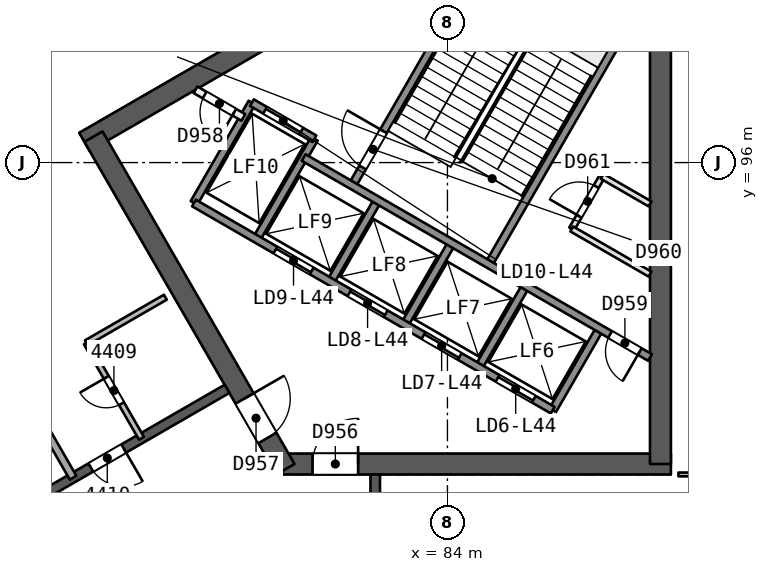
"""IFC4 building model, lengths in metres.
Left out: names, types, materials, properties, quantities, classifications, styles, units other than length and angle.
Written with IfcOpenShell. Run it as: python <this file> out.ifc"""

import sys

from ifc_helpers import new_model, si_unit, direction, frame, frame_2d, origin, place, context, subcontext, project, spatial, rectangle, extrude, element, fill, save


model = new_model("IFC4")
c1 = context("Model", 3, precision=1e-05, world=origin(), true_north=direction((0.0, 1.0)))
c2 = subcontext(c1, "Body", "Model", "MODEL_VIEW")
j1 = project(units=[si_unit("LENGTHUNIT", "METRE"), si_unit("PLANEANGLEUNIT", "RADIAN")], contexts=[c1])
p1 = place(None, origin())
s1 = spatial("IfcSite", under=j1, at=p1, CompositionType="ELEMENT")
p2 = place(p1, origin())
s2 = spatial("IfcBuilding", under=s1, at=p2, CompositionType="ELEMENT")
p3 = place(p2, frame((0.0, 0.0, 182.2)))
s3 = spatial("IfcBuildingStorey", under=s2, at=p3, CompositionType="ELEMENT", Elevation=182.2)
p4 = place(p3, frame((79.659, 88.069, 0.0), z_axis=(0.0, 0.0, 1.0), x_axis=(1.0, 0.0, 0.0)))
e1 = element("IfcWall", 1, at=p4, inside=s3, PredefinedType="SHEAR", context=c2, shape_type="SweptSolid", body=[
    extrude(rectangle(XDim=10.221, YDim=0.55, at=frame_2d((5.111, 0.0))), origin(), (0.0, 0.0, 1.0), 3.7),
])
p5 = place(p4, frame((0.791, 0.0, 0.0)))
e2 = element("IfcOpeningElement", 2, at=p5, cuts=e1, PredefinedType="OPENING", context=c2, shape_type="SweptSolid", body=[
    extrude(rectangle(XDim=1.2, YDim=2.1, at=frame_2d((0.6, 1.05))), frame((0.0, 0.286, 0.0), z_axis=(0.0, -1.0, 0.0), x_axis=(1.0, 0.0, 0.0)), (0.0, 0.0, 1.0), 0.571),
])
p6 = place(p3, frame((89.605, 88.069, 0.0), z_axis=(0.0, 0.0, 1.0), x_axis=(0.0, 1.0, 0.0)))
e3 = element("IfcWall", 3, at=p6, inside=s3, PredefinedType="SHEAR", context=c2, shape_type="SweptSolid", body=[
    extrude(rectangle(XDim=14.058, YDim=0.55, at=frame_2d((7.029, 0.0))), origin(), (0.0, 0.0, 1.0), 3.7),
])
p7 = place(p3, frame((86.723, 103.633, 0.0), z_axis=(0.0, 0.0, 1.0), x_axis=(-0.866023530946, -0.500003243837, 0.0)))
e4 = element("IfcWall", 4, at=p7, inside=s3, PredefinedType="SHEAR", context=c2, shape_type="SweptSolid", body=[
    extrude(rectangle(XDim=14.175, YDim=0.55, at=frame_2d((7.087, 0.0))), origin(), (0.0, 0.0, 1.0), 3.7),
])
p8 = place(p3, frame((74.686, 96.683, 0.0), z_axis=(0.0, 0.0, 1.0), x_axis=(0.499997818338, -0.866026663364, 0.0)))
e5 = element("IfcWall", 5, at=p8, inside=s3, PredefinedType="SHEAR", context=c2, shape_type="SweptSolid", body=[
    extrude(rectangle(XDim=10.105, YDim=0.55, at=frame_2d((5.052, 0.0))), origin(), (0.0, 0.0, 1.0), 3.7),
])
p9 = place(p8, frame((7.955, 0.0, 0.0)))
e6 = element("IfcOpeningElement", 6, at=p9, cuts=e5, PredefinedType="OPENING", context=c2, shape_type="SweptSolid", body=[
    extrude(rectangle(XDim=1.2, YDim=2.1, at=frame_2d((0.6, 1.05))), frame((0.0, 0.286, 0.0), z_axis=(0.0, -1.0, 0.0), x_axis=(1.0, 0.0, 0.0)), (0.0, 0.0, 1.0), 0.571),
])
p10 = place(p3, frame((82.1, 72.206, 0.0), z_axis=(0.0, 0.0, 1.0), x_axis=(0.0, 1.0, 0.0)))
e7 = element("IfcWall", 7, at=p10, inside=s3, PredefinedType="SHEAR", context=c2, shape_type="SweptSolid", body=[
    extrude(rectangle(XDim=15.588, YDim=0.25, at=frame_2d((7.794, 0.0))), origin(), (0.0, 0.0, 1.0), 3.25),
])
p11 = place(p10, frame((2.747, 0.0, 0.0)))
e8 = element("IfcOpeningElement", 8, at=p11, cuts=e7, PredefinedType="OPENING", context=c2, shape_type="SweptSolid", body=[
    extrude(rectangle(XDim=1.0, YDim=2.1, at=frame_2d((0.5, 1.05))), frame((0.0, 0.135, 0.0), z_axis=(0.0, -1.0, 0.0), x_axis=(1.0, 0.0, 0.0)), (0.0, 0.0, 1.0), 0.271),
])
p12 = place(p10, frame((5.396, 0.0, 0.0)))
e9 = element("IfcOpeningElement", 9, at=p12, cuts=e7, PredefinedType="OPENING", context=c2, shape_type="SweptSolid", body=[
    extrude(rectangle(XDim=0.9, YDim=2.1, at=frame_2d((0.45, 1.05))), frame((0.0, 0.135, 0.0), z_axis=(0.0, -1.0, 0.0), x_axis=(1.0, 0.0, 0.0)), (0.0, 0.0, 1.0), 0.271),
])
p13 = place(p10, frame((9.293, 0.0, 0.0)))
e10 = element("IfcOpeningElement", 10, at=p13, cuts=e7, PredefinedType="OPENING", context=c2, shape_type="SweptSolid", body=[
    extrude(rectangle(XDim=0.9, YDim=2.1, at=frame_2d((0.45, 1.05))), frame((0.0, 0.135, 0.0), z_axis=(0.0, -1.0, 0.0), x_axis=(1.0, 0.0, 0.0)), (0.0, 0.0, 1.0), 0.271),
])
p14 = place(p10, frame((13.14, 0.0, 0.0)))
e11 = element("IfcOpeningElement", 11, at=p14, cuts=e7, PredefinedType="OPENING", context=c2, shape_type="SweptSolid", body=[
    extrude(rectangle(XDim=1.0, YDim=2.1, at=frame_2d((0.5, 1.05))), frame((0.0, 0.135, 0.0), z_axis=(0.0, -1.0, 0.0), x_axis=(1.0, 0.0, 0.0)), (0.0, 0.0, 1.0), 0.271),
])
p15 = place(p3, frame((78.2, 90.046, 0.0), z_axis=(0.0, 0.0, 1.0), x_axis=(-0.866026492143, -0.499998114903, 0.0)))
e12 = element("IfcWall", 12, at=p15, inside=s3, PredefinedType="SHEAR", context=c2, shape_type="SweptSolid", body=[
    extrude(rectangle(XDim=15.588, YDim=0.25, at=frame_2d((7.794, 0.0))), origin(), (0.0, 0.0, 1.0), 3.25),
])
p16 = place(p15, frame((3.138, 0.0, 0.0)))
e13 = element("IfcOpeningElement", 13, at=p16, cuts=e12, PredefinedType="OPENING", context=c2, shape_type="SweptSolid", body=[
    extrude(rectangle(XDim=1.0, YDim=2.1, at=frame_2d((0.5, 1.05))), frame((0.0, 0.135, 0.0), z_axis=(0.0, -1.0, 0.0), x_axis=(1.0, 0.0, 0.0)), (0.0, 0.0, 1.0), 0.271),
])
p17 = place(p15, frame((6.415, 0.0, 0.0)))
e14 = element("IfcOpeningElement", 14, at=p17, cuts=e12, PredefinedType="OPENING", context=c2, shape_type="SweptSolid", body=[
    extrude(rectangle(XDim=1.2, YDim=2.4, at=frame_2d((0.6, 1.2))), frame((0.0, 0.135, 0.0), z_axis=(0.0, -1.0, 0.0), x_axis=(1.0, 0.0, 0.0)), (0.0, 0.0, 1.0), 0.271),
])
p18 = place(p15, frame((11.971, 0.0, 0.0)))
e15 = element("IfcOpeningElement", 15, at=p18, cuts=e12, PredefinedType="OPENING", context=c2, shape_type="SweptSolid", body=[
    extrude(rectangle(XDim=1.0, YDim=2.1, at=frame_2d((0.5, 1.05))), frame((0.0, 0.135, 0.0), z_axis=(0.0, -1.0, 0.0), x_axis=(1.0, 0.0, 0.0)), (0.0, 0.0, 1.0), 0.271),
])
p19 = place(p3, frame((93.278, 87.794, 0.0), z_axis=(0.0, 0.0, 1.0), x_axis=(-1.0, 0.0, 0.0)))
e16 = element("IfcWall", 16, at=p19, inside=s3, PredefinedType="PARTITIONING", context=c2, shape_type="SweptSolid", body=[
    extrude(rectangle(XDim=3.199, YDim=0.1, at=frame_2d((1.6, 0.0))), origin(), (0.0, 0.0, 1.0), 3.25),
])
p20 = place(p19, frame((1.15, 0.0, 0.0)))
e17 = element("IfcOpeningElement", 17, at=p20, cuts=e16, PredefinedType="OPENING", context=c2, shape_type="SweptSolid", body=[
    extrude(rectangle(XDim=0.9, YDim=2.1, at=frame_2d((0.45, 1.05))), frame((0.0, 0.061, 0.0), z_axis=(0.0, -1.0, 0.0), x_axis=(1.0, 0.0, 0.0)), (0.0, 0.0, 1.0), 0.121),
])
p21 = place(p3, frame((75.948, 88.746, 0.0), z_axis=(0.0, 0.0, 1.0), x_axis=(-0.499987231761, 0.866032775405, 0.0)))
e18 = element("IfcWall", 18, at=p21, inside=s3, PredefinedType="PARTITIONING", context=c2, shape_type="SweptSolid", body=[
    extrude(rectangle(XDim=2.9, YDim=0.15, at=frame_2d((1.45, 0.0))), origin(), (0.0, 0.0, 1.0), 3.25),
])
p22 = place(p21, frame((1.05, 0.0, 0.0)))
e19 = element("IfcOpeningElement", 19, at=p22, cuts=e18, PredefinedType="OPENING", context=c2, shape_type="SweptSolid", body=[
    extrude(rectangle(XDim=0.8, YDim=2.1, at=frame_2d((0.4, 1.05))), frame((0.0, 0.085, 0.0), z_axis=(0.0, -1.0, 0.0), x_axis=(1.0, 0.0, 0.0)), (0.0, 0.0, 1.0), 0.171),
])
p23 = place(p3, frame((74.498, 91.257, 0.0), z_axis=(0.0, 0.0, 1.0), x_axis=(0.866038271014, 0.499977712642, 0.0)))
e20 = element("IfcWall", 20, at=p23, inside=s3, PredefinedType="PARTITIONING", context=c2, shape_type="SweptSolid", body=[
    extrude(rectangle(XDim=2.401, YDim=0.15, at=frame_2d((1.2, 0.0))), origin(), (0.0, 0.0, 1.0), 3.25),
])
p24 = place(p3, frame((68.561, 97.388, 0.0), z_axis=(0.0, 0.0, 1.0), x_axis=(0.499998478678, -0.866026282118, 0.0)))
e21 = element("IfcWall", 21, at=p24, inside=s3, PredefinedType="PARTITIONING", context=c2, shape_type="SweptSolid", body=[
    extrude(rectangle(XDim=11.178, YDim=0.2, at=frame_2d((5.589, 0.0))), origin(), (0.0, 0.0, 1.0), 3.25),
])
p25 = place(p3, frame((42.841, 82.711, 0.0), z_axis=(0.0, 0.0, 1.0), x_axis=(0.866024774967, 0.500001089142, 0.0)))
e22 = element("IfcWall", 22, at=p25, inside=s3, PredefinedType="SOLIDWALL", context=c2, shape_type="SweptSolid", body=[
    extrude(rectangle(XDim=52.991, YDim=0.3, at=frame_2d((26.496, 0.0))), origin(), (0.0, 0.0, 1.0), 3.25),
])
p26 = place(p25, frame((20.619, 0.0, 0.0)))
e23 = element("IfcOpeningElement", 23, at=p26, cuts=e22, PredefinedType="OPENING", context=c2, shape_type="SweptSolid", body=[
    extrude(rectangle(XDim=2.4, YDim=2.4, at=frame_2d((1.2, 1.2))), frame((0.0, 0.161, 0.0), z_axis=(0.0, -1.0, 0.0), x_axis=(1.0, 0.0, 0.0)), (0.0, 0.0, 1.0), 0.321),
])
p27 = place(p25, frame((9.392, 0.0, 0.0)))
e24 = element("IfcOpeningElement", 24, at=p27, cuts=e22, PredefinedType="OPENING", context=c2, shape_type="SweptSolid", body=[
    extrude(rectangle(XDim=2.4, YDim=2.4, at=frame_2d((1.2, 1.2))), frame((0.0, 0.161, 0.0), z_axis=(0.0, -1.0, 0.0), x_axis=(1.0, 0.0, 0.0)), (0.0, 0.0, 1.0), 0.321),
])
p28 = place(p25, frame((40.145, 0.0, 0.0)))
e25 = element("IfcOpeningElement", 25, at=p28, cuts=e22, PredefinedType="OPENING", context=c2, shape_type="SweptSolid", body=[
    extrude(rectangle(XDim=2.4, YDim=2.4, at=frame_2d((1.2, 1.2))), frame((0.0, 0.161, 0.0), z_axis=(0.0, -1.0, 0.0), x_axis=(1.0, 0.0, 0.0)), (0.0, 0.0, 1.0), 0.321),
])
p29 = place(p25, frame((26.375, 0.0, 0.9)))
e26 = element("IfcOpeningElement", 26, at=p29, cuts=e22, PredefinedType="OPENING", context=c2, shape_type="SweptSolid", body=[
    extrude(rectangle(XDim=1.8, YDim=1.5, at=frame_2d((0.9, 0.75))), frame((0.0, 0.161, 0.0), z_axis=(0.0, -1.0, 0.0), x_axis=(1.0, 0.0, 0.0)), (0.0, 0.0, 1.0), 0.321),
])
p30 = place(p3, frame((86.77, 89.486, 0.0), z_axis=(0.0, 0.0, 1.0), x_axis=(0.499961042966, 0.86604789447, 0.0)))
e27 = element("IfcWall", 27, at=p30, inside=s3, PredefinedType="SOLIDWALL", context=c2, shape_type="SweptSolid", body=[
    extrude(rectangle(XDim=2.48, YDim=0.2, at=frame_2d((1.24, 0.0))), origin(), (0.0, 0.0, 1.0), 3.25),
])
p31 = place(p3, frame((87.271, 94.254, 0.0), z_axis=(0.0, 0.0, 1.0), x_axis=(0.499995408039, 0.866028054938, 0.0)))
e28 = element("IfcWall", 28, at=p31, inside=s3, PredefinedType="PARTITIONING", context=c2, shape_type="SweptSolid", body=[
    extrude(rectangle(XDim=1.6, YDim=0.15, at=frame_2d((0.8, 0.0))), origin(), (0.0, 0.0, 1.0), 3.25),
])
p32 = place(p31, frame((0.387, 0.0, 0.0)))
e29 = element("IfcOpeningElement", 29, at=p32, cuts=e28, PredefinedType="OPENING", context=c2, shape_type="SweptSolid", body=[
    extrude(rectangle(XDim=0.9, YDim=2.1, at=frame_2d((0.45, 1.05))), frame((0.0, 0.085, 0.0), z_axis=(0.0, -1.0, 0.0), x_axis=(1.0, 0.0, 0.0)), (0.0, 0.0, 1.0), 0.171),
])
p33 = place(p3, frame((84.821, 90.611, 0.0), z_axis=(0.0, 0.0, 1.0), x_axis=(0.499961042966, 0.86604789447, 0.0)))
e30 = element("IfcWall", 30, at=p33, inside=s3, PredefinedType="SOLIDWALL", context=c2, shape_type="SweptSolid", body=[
    extrude(rectangle(XDim=2.48, YDim=0.2, at=frame_2d((1.24, 0.0))), origin(), (0.0, 0.0, 1.0), 3.25),
])
p34 = place(p3, frame((85.087, 93.321, 0.0), z_axis=(0.0, 0.0, 1.0), x_axis=(0.500019787375, 0.866013979237, 0.0)))
e31 = element("IfcWall", 31, at=p34, inside=s3, PredefinedType="SOLIDWALL", context=c2, shape_type="SweptSolid", body=[
    extrude(rectangle(XDim=7.7, YDim=0.2, at=frame_2d((3.85, 0.0))), origin(), (0.0, 0.0, 1.0), 3.25),
])
for number, where, z_axis, x_axis in (
    (32, (82.873, 91.736, 0.0), (0.0, 0.0, 1.0), (0.5, 0.866, 0.0)),
    (33, (80.924, 92.861, 0.0), (0.0, 0.0, 1.0), (0.5, 0.866, 0.0)),
):
    element("IfcWall", number, at=place(p3, frame(where, z_axis=z_axis, x_axis=x_axis)), inside=s3, PredefinedType="SOLIDWALL", context=c2, shape_type="SweptSolid", body=[
        extrude(rectangle(XDim=2.48, YDim=0.2, at=frame_2d((1.24, 0.0))), origin(), (0.0, 0.0, 1.0), 3.25),
    ])
p35 = place(p3, frame((81.493, 95.396, 0.0), z_axis=(0.0, 0.0, 1.0), x_axis=(0.500006057782, 0.866021906294, 0.0)))
e34 = element("IfcWall", 34, at=p35, inside=s3, PredefinedType="SOLIDWALL", context=c2, shape_type="SweptSolid", body=[
    extrude(rectangle(XDim=7.7, YDim=0.2, at=frame_2d((3.85, 0.0))), origin(), (0.0, 0.0, 1.0), 3.25),
])
p36 = place(p35, frame((0.55, 0.0, 0.0)))
e35 = element("IfcOpeningElement", 35, at=p36, cuts=e34, PredefinedType="OPENING", context=c2, shape_type="SweptSolid", body=[
    extrude(rectangle(XDim=1.1, YDim=2.1, at=frame_2d((0.55, 1.05))), frame((0.0, 0.11, 0.0), z_axis=(0.0, -1.0, 0.0), x_axis=(1.0, 0.0, 0.0)), (0.0, 0.0, 1.0), 0.221),
])
for number, where, z_axis, x_axis in (
    (36, (78.976, 93.986, 0.0), (0.0, 0.0, 1.0), (0.5, 0.866, 0.0)),
    (37, (77.33, 94.936, 0.0), (0.0, 0.0, 1.0), (0.5, 0.866, 0.0)),
):
    element("IfcWall", number, at=place(p3, frame(where, z_axis=z_axis, x_axis=x_axis)), inside=s3, PredefinedType="SOLIDWALL", context=c2, shape_type="SweptSolid", body=[
        extrude(rectangle(XDim=3.05, YDim=0.2, at=frame_2d((1.525, 0.0))), origin(), (0.0, 0.0, 1.0), 3.25),
    ])
p37 = place(p3, frame((86.77, 89.486, 0.0), z_axis=(0.0, 0.0, 1.0), x_axis=(-0.86601811187, 0.500012629753, 0.0)))
e38 = element("IfcWall", 38, at=p37, inside=s3, PredefinedType="SOLIDWALL", context=c2, shape_type="SweptSolid", body=[
    extrude(rectangle(XDim=10.9, YDim=0.2, at=frame_2d((5.45, 0.0))), origin(), (0.0, 0.0, 1.0), 3.25),
])
p38 = place(p37, frame((0.575, 0.0, 0.0)))
e39 = element("IfcOpeningElement", 39, at=p38, cuts=e38, PredefinedType="OPENING", context=c2, shape_type="SweptSolid", body=[
    extrude(rectangle(XDim=1.1, YDim=2.1, at=frame_2d((0.55, 1.05))), frame((0.0, 0.11, 0.0), z_axis=(0.0, -1.0, 0.0), x_axis=(1.0, 0.0, 0.0)), (0.0, 0.0, 1.0), 0.221),
])
p39 = place(p37, frame((2.825, 0.0, 0.0)))
e40 = element("IfcOpeningElement", 40, at=p39, cuts=e38, PredefinedType="OPENING", context=c2, shape_type="SweptSolid", body=[
    extrude(rectangle(XDim=1.1, YDim=2.1, at=frame_2d((0.55, 1.05))), frame((0.0, 0.11, 0.0), z_axis=(0.0, -1.0, 0.0), x_axis=(1.0, 0.0, 0.0)), (0.0, 0.0, 1.0), 0.221),
])
p40 = place(p37, frame((5.075, 0.0, 0.0)))
e41 = element("IfcOpeningElement", 41, at=p40, cuts=e38, PredefinedType="OPENING", context=c2, shape_type="SweptSolid", body=[
    extrude(rectangle(XDim=1.1, YDim=2.1, at=frame_2d((0.55, 1.05))), frame((0.0, 0.11, 0.0), z_axis=(0.0, -1.0, 0.0), x_axis=(1.0, 0.0, 0.0)), (0.0, 0.0, 1.0), 0.221),
])
p41 = place(p37, frame((7.325, 0.0, 0.0)))
e42 = element("IfcOpeningElement", 42, at=p41, cuts=e38, PredefinedType="OPENING", context=c2, shape_type="SweptSolid", body=[
    extrude(rectangle(XDim=1.1, YDim=2.1, at=frame_2d((0.55, 1.05))), frame((0.0, 0.11, 0.0), z_axis=(0.0, -1.0, 0.0), x_axis=(1.0, 0.0, 0.0)), (0.0, 0.0, 1.0), 0.221),
])
p42 = place(p3, frame((89.33, 90.872, 0.0), z_axis=(0.0, 0.0, 1.0), x_axis=(-0.866027589512, 0.49999621419, 0.0)))
e43 = element("IfcWall", 43, at=p42, inside=s3, PredefinedType="SOLIDWALL", context=c2, shape_type="SweptSolid", body=[
    extrude(rectangle(XDim=10.524, YDim=0.2, at=frame_2d((5.262, 0.0))), origin(), (0.0, 0.0, 1.0), 3.25),
])
p43 = place(p42, frame((0.312, 0.0, 0.0)))
e44 = element("IfcOpeningElement", 44, at=p43, cuts=e43, PredefinedType="OPENING", context=c2, shape_type="SweptSolid", body=[
    extrude(rectangle(XDim=0.9, YDim=2.1, at=frame_2d((0.45, 1.05))), frame((0.0, 0.11, 0.0), z_axis=(0.0, -1.0, 0.0), x_axis=(1.0, 0.0, 0.0)), (0.0, 0.0, 1.0), 0.221),
])
p44 = place(p3, frame((78.63, 97.188, 0.0), z_axis=(0.0, 0.0, 1.0), x_axis=(-0.866003949776, 0.500037157592, 0.0)))
e45 = element("IfcWall", 45, at=p44, inside=s3, PredefinedType="PARTITIONING", context=c2, shape_type="SweptSolid", body=[
    extrude(rectangle(XDim=1.455, YDim=0.2, at=frame_2d((0.728, 0.0))), origin(), (0.0, 0.0, 1.0), 3.25),
])
p45 = place(p44, frame((0.278, 0.0, 0.0)))
e46 = element("IfcOpeningElement", 46, at=p45, cuts=e45, PredefinedType="OPENING", context=c2, shape_type="SweptSolid", body=[
    extrude(rectangle(XDim=0.9, YDim=2.1, at=frame_2d((0.45, 1.05))), frame((0.0, 0.11, 0.0), z_axis=(0.0, -1.0, 0.0), x_axis=(1.0, 0.0, 0.0)), (0.0, 0.0, 1.0), 0.221),
])
p46 = place(p3, frame((80.5, 96.627, 0.0), z_axis=(0.0, 0.0, 1.0), x_axis=(-0.86601224135, 0.500022797313, 0.0)))
e47 = element("IfcWall", 47, at=p46, inside=s3, PredefinedType="SOLIDWALL", context=c2, shape_type="SweptSolid", body=[
    extrude(rectangle(XDim=1.9, YDim=0.2, at=frame_2d((0.95, 0.0))), origin(), (0.0, 0.0, 1.0), 3.25),
])
p47 = place(p46, frame((0.4, 0.0, 0.0)))
e48 = element("IfcOpeningElement", 48, at=p47, cuts=e47, PredefinedType="OPENING", context=c2, shape_type="SweptSolid", body=[
    extrude(rectangle(XDim=1.1, YDim=2.1, at=frame_2d((0.55, 1.05))), frame((0.0, 0.11, 0.0), z_axis=(0.0, -1.0, 0.0), x_axis=(1.0, 0.0, 0.0)), (0.0, 0.0, 1.0), 0.221),
])
p48 = place(p3, frame((89.33, 93.065, 0.0), z_axis=(0.0, 0.0, 1.0), x_axis=(-0.866041951395, 0.499971337603, 0.0)))
e49 = element("IfcWall", 49, at=p48, inside=s3, PredefinedType="PARTITIONING", context=c2, shape_type="SweptSolid", body=[
    extrude(rectangle(XDim=2.378, YDim=0.15, at=frame_2d((1.189, 0.0))), origin(), (0.0, 0.0, 1.0), 3.25),
])
p49 = place(p3, frame((89.33, 94.913, 0.0), z_axis=(0.0, 0.0, 1.0), x_axis=(-0.865981433661, 0.500076150755, 0.0)))
e50 = element("IfcWall", 50, at=p49, inside=s3, PredefinedType="PARTITIONING", context=c2, shape_type="SweptSolid", body=[
    extrude(rectangle(XDim=1.454, YDim=0.15, at=frame_2d((0.727, 0.0))), origin(), (0.0, 0.0, 1.0), 3.25),
])
p50 = place(p22, origin())
e51 = element("IfcDoor", 51, at=p50, inside=s3, OperationType="SINGLE_SWING_RIGHT", PredefinedType="NOTDEFINED", context=c2, shape_type="SweptSolid", body=[
    extrude(rectangle(XDim=0.8, YDim=2.1, at=frame_2d((0.4, 1.05))), frame((0.0, 0.025, 0.0), z_axis=(0.0, -1.0, 0.0), x_axis=(1.0, 0.0, 0.0)), (0.0, 0.0, 1.0), 0.05),
])
fill(e19, e51)
p51 = place(p16, origin())
e52 = element("IfcDoor", 52, at=p51, inside=s3, OperationType="SINGLE_SWING_LEFT", PredefinedType="NOTDEFINED", context=c2, shape_type="SweptSolid", body=[
    extrude(rectangle(XDim=1.0, YDim=2.1, at=frame_2d((0.5, 1.05))), frame((0.0, 0.025, 0.0), z_axis=(0.0, -1.0, 0.0), x_axis=(1.0, 0.0, 0.0)), (0.0, 0.0, 1.0), 0.05),
])
fill(e13, e52)
p52 = place(p5, origin())
e53 = element("IfcDoor", 53, at=p52, inside=s3, OperationType="SINGLE_SWING_RIGHT", PredefinedType="NOTDEFINED", context=c2, shape_type="SweptSolid", body=[
    extrude(rectangle(XDim=1.2, YDim=2.1, at=frame_2d((0.6, 1.05))), frame((0.0, 0.025, 0.0), z_axis=(0.0, -1.0, 0.0), x_axis=(1.0, 0.0, 0.0)), (0.0, 0.0, 1.0), 0.05),
])
fill(e2, e53)
p53 = place(p9, origin())
e54 = element("IfcDoor", 54, at=p53, inside=s3, OperationType="SINGLE_SWING_LEFT", PredefinedType="NOTDEFINED", context=c2, shape_type="SweptSolid", body=[
    extrude(rectangle(XDim=1.2, YDim=2.1, at=frame_2d((0.6, 1.05))), frame((0.0, 0.025, 0.0), z_axis=(0.0, -1.0, 0.0), x_axis=(1.0, 0.0, 0.0)), (0.0, 0.0, 1.0), 0.05),
])
fill(e6, e54)
p54 = place(p38, origin())
e55 = element("IfcDoor", 55, at=p54, inside=s3, OperationType="SLIDING_TO_RIGHT", PredefinedType="NOTDEFINED", context=c2, shape_type="SweptSolid", body=[
    extrude(rectangle(XDim=1.1, YDim=2.1, at=frame_2d((0.55, 1.05))), frame((0.0, 0.025, 0.0), z_axis=(0.0, -1.0, 0.0), x_axis=(1.0, 0.0, 0.0)), (0.0, 0.0, 1.0), 0.05),
])
fill(e39, e55)
p55 = place(p39, origin())
e56 = element("IfcDoor", 56, at=p55, inside=s3, OperationType="SLIDING_TO_LEFT", PredefinedType="NOTDEFINED", context=c2, shape_type="SweptSolid", body=[
    extrude(rectangle(XDim=1.1, YDim=2.1, at=frame_2d((0.55, 1.05))), frame((0.0, 0.025, 0.0), z_axis=(0.0, -1.0, 0.0), x_axis=(1.0, 0.0, 0.0)), (0.0, 0.0, 1.0), 0.05),
])
fill(e40, e56)
p56 = place(p40, origin())
e57 = element("IfcDoor", 57, at=p56, inside=s3, OperationType="SLIDING_TO_RIGHT", PredefinedType="NOTDEFINED", context=c2, shape_type="SweptSolid", body=[
    extrude(rectangle(XDim=1.1, YDim=2.1, at=frame_2d((0.55, 1.05))), frame((0.0, 0.025, 0.0), z_axis=(0.0, -1.0, 0.0), x_axis=(1.0, 0.0, 0.0)), (0.0, 0.0, 1.0), 0.05),
])
fill(e41, e57)
p57 = place(p41, origin())
e58 = element("IfcDoor", 58, at=p57, inside=s3, OperationType="SLIDING_TO_LEFT", PredefinedType="NOTDEFINED", context=c2, shape_type="SweptSolid", body=[
    extrude(rectangle(XDim=1.1, YDim=2.1, at=frame_2d((0.55, 1.05))), frame((0.0, 0.025, 0.0), z_axis=(0.0, -1.0, 0.0), x_axis=(1.0, 0.0, 0.0)), (0.0, 0.0, 1.0), 0.05),
])
fill(e42, e58)
p58 = place(p47, origin())
e59 = element("IfcDoor", 59, at=p58, inside=s3, OperationType="SLIDING_TO_RIGHT", PredefinedType="NOTDEFINED", context=c2, shape_type="SweptSolid", body=[
    extrude(rectangle(XDim=1.1, YDim=2.1, at=frame_2d((0.55, 1.05))), frame((0.0, 0.025, 0.0), z_axis=(0.0, -1.0, 0.0), x_axis=(1.0, 0.0, 0.0)), (0.0, 0.0, 1.0), 0.05),
])
fill(e48, e59)
p59 = place(p45, origin())
e60 = element("IfcDoor", 60, at=p59, inside=s3, OperationType="SINGLE_SWING_LEFT", PredefinedType="NOTDEFINED", context=c2, shape_type="SweptSolid", body=[
    extrude(rectangle(XDim=0.9, YDim=2.1, at=frame_2d((0.45, 1.05))), frame((0.0, 0.025, 0.0), z_axis=(0.0, -1.0, 0.0), x_axis=(1.0, 0.0, 0.0)), (0.0, 0.0, 1.0), 0.05),
])
fill(e46, e60)
p60 = place(p43, origin())
e61 = element("IfcDoor", 61, at=p60, inside=s3, OperationType="SINGLE_SWING_LEFT", PredefinedType="NOTDEFINED", context=c2, shape_type="SweptSolid", body=[
    extrude(rectangle(XDim=0.9, YDim=2.1, at=frame_2d((0.45, 1.05))), frame((0.0, 0.025, 0.0), z_axis=(0.0, -1.0, 0.0), x_axis=(1.0, 0.0, 0.0)), (0.0, 0.0, 1.0), 0.05),
])
fill(e44, e61)
p61 = place(p36, origin())
e62 = element("IfcDoor", 62, at=p61, inside=s3, OperationType="SINGLE_SWING_RIGHT", PredefinedType="NOTDEFINED", context=c2, shape_type="SweptSolid", body=[
    extrude(rectangle(XDim=1.1, YDim=2.1, at=frame_2d((0.55, 1.05))), frame((0.0, 0.025, 0.0), z_axis=(0.0, -1.0, 0.0), x_axis=(1.0, 0.0, 0.0)), (0.0, 0.0, 1.0), 0.05),
])
fill(e35, e62)
p62 = place(p32, origin())
e63 = element("IfcDoor", 63, at=p62, inside=s3, OperationType="SINGLE_SWING_LEFT", PredefinedType="NOTDEFINED", context=c2, shape_type="SweptSolid", body=[
    extrude(rectangle(XDim=0.9, YDim=2.1, at=frame_2d((0.45, 1.05))), frame((0.0, 0.025, 0.0), z_axis=(0.0, -1.0, 0.0), x_axis=(1.0, 0.0, 0.0)), (0.0, 0.0, 1.0), 0.05),
])
fill(e29, e63)
save(model, sys.argv[1])
